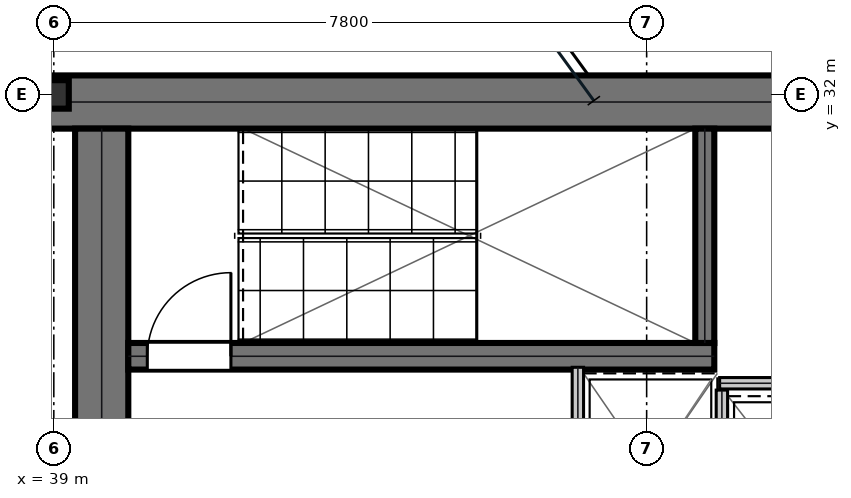
"""IFC4 building model, lengths in metres.
Left out: names, types, materials, properties, quantities, classifications, styles, units other than length and angle.
Written with IfcOpenShell. Run it as: python <this file> out.ifc"""

import sys

from ifc_helpers import new_model, si_unit, direction, frame, frame_2d, origin, origin_2d, place, context, subcontext, project, spatial, rectangle, i_section, extrude, element, fill, save


model = new_model("IFC4")
c1 = context("Model", 3, precision=1e-05, world=origin(), true_north=direction((0.0, 1.0)))
c2 = subcontext(c1, "Body", "Model", "MODEL_VIEW")
j1 = project(units=[si_unit("LENGTHUNIT", "METRE"), si_unit("PLANEANGLEUNIT", "RADIAN")], contexts=[c1])
p1 = place(None, origin())
s1 = spatial("IfcSite", under=j1, at=p1, CompositionType="ELEMENT")
p2 = place(p1, origin())
s2 = spatial("IfcBuilding", under=s1, at=p2, CompositionType="ELEMENT")
p3 = place(p2, frame((0.0, 0.0, 228.3)))
s3 = spatial("IfcBuildingStorey", under=s2, at=p3, CompositionType="ELEMENT", Elevation=228.3)
p4 = place(p3, frame((38.8, 31.9, 0.0), z_axis=(0.0, 0.0, 1.0), x_axis=(1.0, 0.0, 0.0)))
e1 = element("IfcWall", 1, at=p4, inside=s3, PredefinedType="SHEAR", context=c2, shape_type="SweptSolid", body=[
    extrude(rectangle(XDim=16.0, YDim=0.7, at=frame_2d((8.0, 0.0))), origin(), (0.0, 0.0, 1.0), 3.79),
])
p5 = place(p3, frame((39.63, 25.4, 0.0), z_axis=(0.0, 0.0, 1.0), x_axis=(0.0, 1.0, 0.0)))
e2 = element("IfcWall", 2, at=p5, inside=s3, PredefinedType="SHEAR", context=c2, shape_type="SweptSolid", body=[
    extrude(rectangle(XDim=6.15, YDim=0.7, at=frame_2d((3.075, 0.0))), origin(), (0.0, 0.0, 1.0), 3.79),
])
p6 = place(p3, frame((39.98, 28.555, 0.0), z_axis=(0.0, 0.0, 1.0), x_axis=(1.0, 0.0, 0.0)))
e3 = element("IfcWall", 3, at=p6, inside=s3, PredefinedType="SHEAR", context=c2, shape_type="SweptSolid", body=[
    extrude(rectangle(XDim=7.71, YDim=0.35, at=frame_2d((3.855, 0.0))), origin(), (0.0, 0.0, 1.0), 3.79),
])
p7 = place(p6, frame((0.25, 0.0, 0.0)))
e4 = element("IfcOpeningElement", 4, at=p7, cuts=e3, PredefinedType="OPENING", context=c2, shape_type="SweptSolid", body=[
    extrude(rectangle(XDim=1.1, YDim=2.15, at=frame_2d((0.55, 1.075))), frame((0.0, 0.185, 0.0), z_axis=(0.0, -1.0, 0.0), x_axis=(1.0, 0.0, 0.0)), (0.0, 0.0, 1.0), 0.37),
])
p8 = place(p3, frame((47.565, 28.73, 0.0), z_axis=(0.0, 0.0, 1.0), x_axis=(0.0, 1.0, 0.0)))
e5 = element("IfcWall", 5, at=p8, inside=s3, PredefinedType="SHEAR", context=c2, shape_type="SweptSolid", body=[
    extrude(rectangle(XDim=2.82, YDim=0.25, at=frame_2d((1.41, 0.0))), origin(), (0.0, 0.0, 1.0), 3.79),
])
p9 = place(p3, frame((39.0, 32.0, 0.0), z_axis=(0.0, 0.0, 1.0), x_axis=(1.0, 0.0, 0.0)))
e6 = element("IfcColumn", 6, at=p9, inside=s3, PredefinedType="COLUMN", context=c2, shape_type="SweptSolid", body=[
    extrude(i_section(OverallWidth=0.394, OverallDepth=0.375, WebThickness=0.017, FlangeThickness=0.028, at=origin_2d()), origin(), (0.0, 0.0, 1.0), 4.044),
])
p10 = place(p3, frame((45.895, 25.69, 0.0), z_axis=(0.0, 0.0, 1.0), x_axis=(0.0, 1.0, 0.0)))
e7 = element("IfcWall", 7, at=p10, inside=s3, PredefinedType="PARTITIONING", context=c2, shape_type="SweptSolid", body=[
    extrude(rectangle(XDim=2.72, YDim=0.15, at=frame_2d((1.36, 0.0))), origin(), (0.0, 0.0, 1.0), 3.79),
])
p11 = place(p10, frame((0.81, 0.0, 0.0)))
e8 = element("IfcOpeningElement", 8, at=p11, cuts=e7, PredefinedType="OPENING", context=c2, shape_type="SweptSolid", body=[
    extrude(rectangle(XDim=1.1, YDim=2.15, at=frame_2d((0.55, 1.075))), frame((0.0, 0.085, 0.0), z_axis=(0.0, -1.0, 0.0), x_axis=(1.0, 0.0, 0.0)), (0.0, 0.0, 1.0), 0.17),
])
p12 = place(p3, frame((47.79, 25.695, 0.0), z_axis=(0.0, 0.0, 1.0), x_axis=(0.0, 1.0, 0.0)))
e9 = element("IfcWall", 9, at=p12, inside=s3, PredefinedType="PARTITIONING", context=c2, shape_type="SweptSolid", body=[
    extrude(rectangle(XDim=2.415, YDim=0.15, at=frame_2d((1.208, 0.0))), origin(), (0.0, 0.0, 1.0), 3.79),
])
p13 = place(p3, frame((47.76, 28.2, 0.0), z_axis=(0.0, 0.0, 1.0), x_axis=(1.0, 0.0, 0.0)))
e10 = element("IfcWall", 10, at=p13, inside=s3, PredefinedType="PARTITIONING", context=c2, shape_type="SweptSolid", body=[
    extrude(rectangle(XDim=2.04, YDim=0.15, at=frame_2d((1.02, 0.0))), origin(), (0.0, 0.0, 1.0), 3.79),
])
p14 = place(p7, origin())
e11 = element("IfcDoor", 11, at=p14, inside=s3, OperationType="SINGLE_SWING_RIGHT", PredefinedType="DOOR", context=c2, shape_type="SweptSolid", body=[
    extrude(rectangle(XDim=1.1, YDim=2.15, at=frame_2d((0.55, 1.075))), frame((0.0, 0.025, 0.0), z_axis=(0.0, -1.0, 0.0), x_axis=(1.0, 0.0, 0.0)), (0.0, 0.0, 1.0), 0.05),
])
fill(e4, e11)
save(model, sys.argv[1])
